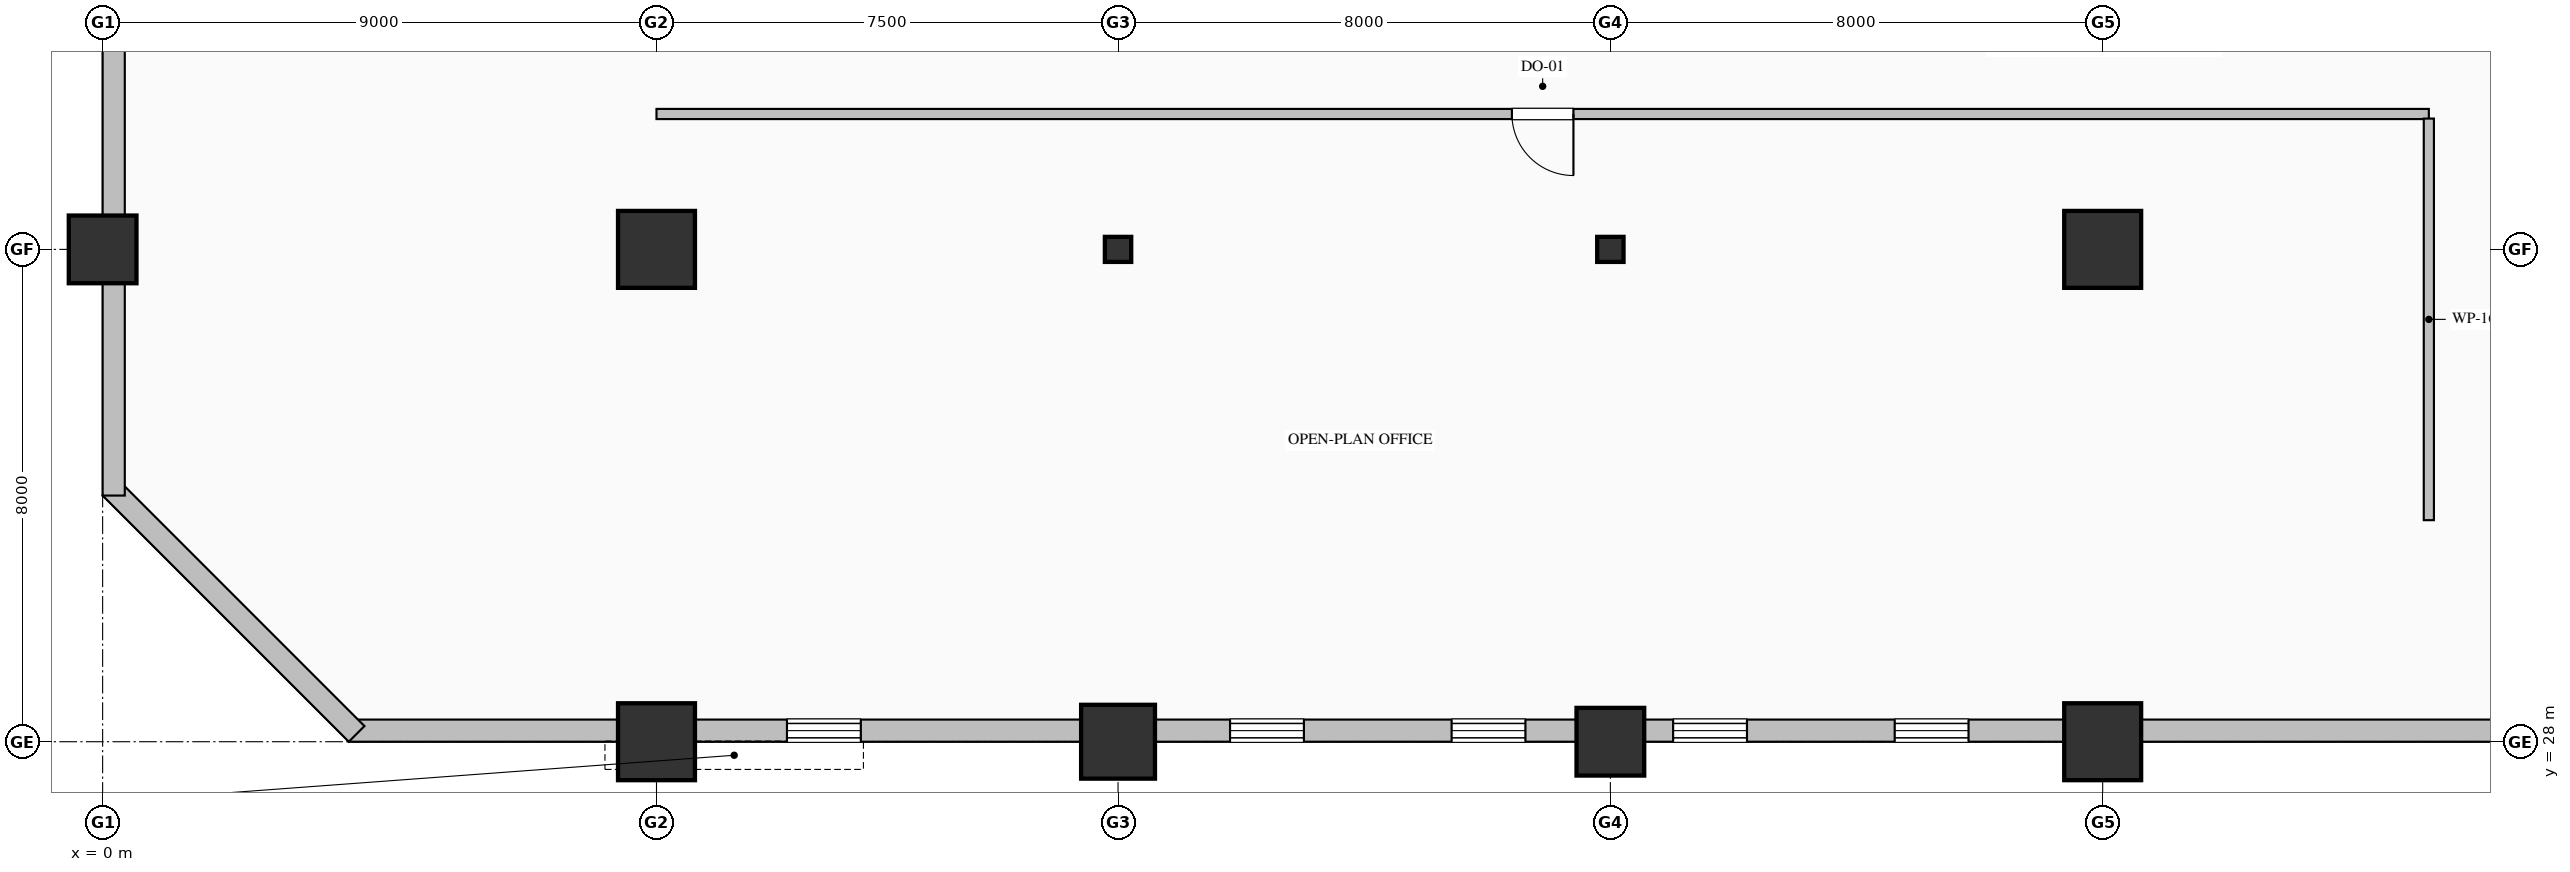
"""IFC4 building model, lengths in metres.
Left out: names, types, materials, properties, quantities, classifications, styles, units other than length and angle.
Written with IfcOpenShell. Run it as: python <this file> out.ifc"""

import sys

from ifc_helpers import new_model, si_unit, direction, frame, frame_2d, origin, origin_2d, place, context, subcontext, project, spatial, rectangle, hollow_rectangle, hollow_circle, i_section, extrude, element, fill, save


model = new_model("IFC4")
c1 = context("Model", 3, precision=1e-05, world=origin(), true_north=direction((0.0, 1.0)))
c2 = subcontext(c1, "Body", "Model", "MODEL_VIEW")
j1 = project(units=[si_unit("LENGTHUNIT", "METRE"), si_unit("PLANEANGLEUNIT", "RADIAN")], contexts=[c1])
p1 = place(None, origin())
s1 = spatial("IfcSite", under=j1, at=p1, CompositionType="ELEMENT")
p2 = place(p1, origin())
s2 = spatial("IfcBuilding", under=s1, at=p2, CompositionType="ELEMENT")
p3 = place(p2, frame((0.0, 0.0, 32.2)))
s3 = spatial("IfcBuildingStorey", under=s2, at=p3, CompositionType="ELEMENT", Elevation=32.2)
p4 = place(p3, frame((0.0, 36.0, 0.0), z_axis=(0.0, 0.0, 1.0), x_axis=(1.0, 0.0, 0.0)))
e1 = element("IfcColumn", 1, at=p4, inside=s3, PredefinedType="COLUMN", context=c2, shape_type="SweptSolid", body=[
    extrude(hollow_rectangle(XDim=1.1, YDim=1.1, WallThickness=0.04, at=origin_2d()), origin(), (0.0, 0.0, 1.0), 4.0),
])
for number, where, z_axis, x_axis in (
    (2, (9.0, 28.0, 0.0), (0.0, 0.0, 1.0), (1.0, 0.0, 0.0)),
    (3, (9.0, 36.0, 0.0), (0.0, 0.0, 1.0), (1.0, 0.0, 0.0)),
):
    element("IfcColumn", number, at=place(p3, frame(where, z_axis=z_axis, x_axis=x_axis)), inside=s3, PredefinedType="COLUMN", context=c2, shape_type="SweptSolid", body=[
        extrude(hollow_rectangle(XDim=1.25, YDim=1.25, WallThickness=0.045, at=origin_2d()), origin(), (0.0, 0.0, 1.0), 4.0),
    ])
p5 = place(p3, frame((16.5, 28.0, 0.0), z_axis=(0.0, 0.0, 1.0), x_axis=(1.0, 0.0, 0.0)))
e4 = element("IfcColumn", 4, at=p5, inside=s3, PredefinedType="COLUMN", context=c2, shape_type="SweptSolid", body=[
    extrude(hollow_circle(Radius=0.6, WallThickness=0.04, at=origin_2d()), origin(), (0.0, 0.0, 1.0), 4.0),
])
p6 = place(p3, frame((16.5, 36.0, 0.0), z_axis=(0.0, 0.0, 1.0), x_axis=(1.0, 0.0, 0.0)))
e5 = element("IfcColumn", 5, at=p6, inside=s3, PredefinedType="COLUMN", context=c2, shape_type="SweptSolid", body=[
    extrude(i_section(OverallWidth=0.407, OverallDepth=0.428, WebThickness=0.02, FlangeThickness=0.035, FilletRadius=0.022, at=origin_2d()), origin(), (0.0, 0.0, 1.0), 4.0),
])
p7 = place(p3, frame((24.5, 28.0, 0.0), z_axis=(0.0, 0.0, 1.0), x_axis=(1.0, 0.0, 0.0)))
e6 = element("IfcColumn", 6, at=p7, inside=s3, PredefinedType="COLUMN", context=c2, shape_type="SweptSolid", body=[
    extrude(hollow_rectangle(XDim=1.1, YDim=1.1, WallThickness=0.04, at=origin_2d()), origin(), (0.0, 0.0, 1.0), 4.0),
])
p8 = place(p3, frame((24.5, 36.0, 0.0), z_axis=(0.0, 0.0, 1.0), x_axis=(1.0, 0.0, 0.0)))
e7 = element("IfcColumn", 7, at=p8, inside=s3, PredefinedType="COLUMN", context=c2, shape_type="SweptSolid", body=[
    extrude(i_section(OverallWidth=0.407, OverallDepth=0.428, WebThickness=0.02, FlangeThickness=0.035, FilletRadius=0.022, at=origin_2d()), origin(), (0.0, 0.0, 1.0), 4.0),
])
for number, where, z_axis, x_axis in (
    (8, (32.5, 28.0, 0.0), (0.0, 0.0, 1.0), (1.0, 0.0, 0.0)),
    (9, (32.5, 36.0, 0.0), (0.0, 0.0, 1.0), (1.0, 0.0, 0.0)),
):
    element("IfcColumn", number, at=place(p3, frame(where, z_axis=z_axis, x_axis=x_axis)), inside=s3, PredefinedType="COLUMN", context=c2, shape_type="SweptSolid", body=[
        extrude(hollow_rectangle(XDim=1.25, YDim=1.25, WallThickness=0.045, at=origin_2d()), origin(), (0.0, 0.0, 1.0), 4.0),
    ])
p9 = place(p3, frame((40.52, 28.18, 0.0), z_axis=(0.0, 0.0, 1.0), x_axis=(-1.0, 0.0, 0.0)))
e10 = element("IfcWall", 10, at=p9, inside=s3, PredefinedType="SOLIDWALL", context=c2, shape_type="SweptSolid", body=[
    extrude(rectangle(XDim=36.52, YDim=0.36, at=frame_2d((18.26, 0.0))), origin(), (0.0, 0.0, 1.0), 3.05),
])
p10 = place(p9, frame((10.2, 0.0, 0.7)))
e11 = element("IfcOpeningElement", 11, at=p10, cuts=e10, PredefinedType="OPENING", context=c2, shape_type="SweptSolid", body=[
    extrude(rectangle(XDim=1.2, YDim=1.85, at=frame_2d((0.6, 0.925))), frame((0.0, 0.19, 0.0), z_axis=(0.0, -1.0, 0.0), x_axis=(1.0, 0.0, 0.0)), (0.0, 0.0, 1.0), 0.38),
])
p11 = place(p9, frame((13.8, 0.0, 0.7)))
e12 = element("IfcOpeningElement", 12, at=p11, cuts=e10, PredefinedType="OPENING", context=c2, shape_type="SweptSolid", body=[
    extrude(rectangle(XDim=1.2, YDim=1.85, at=frame_2d((0.6, 0.925))), frame((0.0, 0.19, 0.0), z_axis=(0.0, -1.0, 0.0), x_axis=(1.0, 0.0, 0.0)), (0.0, 0.0, 1.0), 0.38),
])
p12 = place(p9, frame((17.4, 0.0, 0.7)))
e13 = element("IfcOpeningElement", 13, at=p12, cuts=e10, PredefinedType="OPENING", context=c2, shape_type="SweptSolid", body=[
    extrude(rectangle(XDim=1.2, YDim=1.85, at=frame_2d((0.6, 0.925))), frame((0.0, 0.19, 0.0), z_axis=(0.0, -1.0, 0.0), x_axis=(1.0, 0.0, 0.0)), (0.0, 0.0, 1.0), 0.38),
])
p13 = place(p9, frame((21.0, 0.0, 0.7)))
e14 = element("IfcOpeningElement", 14, at=p13, cuts=e10, PredefinedType="OPENING", context=c2, shape_type="SweptSolid", body=[
    extrude(rectangle(XDim=1.2, YDim=1.85, at=frame_2d((0.6, 0.925))), frame((0.0, 0.19, 0.0), z_axis=(0.0, -1.0, 0.0), x_axis=(1.0, 0.0, 0.0)), (0.0, 0.0, 1.0), 0.38),
])
p14 = place(p9, frame((28.2, 0.0, 0.7)))
e15 = element("IfcOpeningElement", 15, at=p14, cuts=e10, PredefinedType="OPENING", context=c2, shape_type="SweptSolid", body=[
    extrude(rectangle(XDim=1.2, YDim=1.85, at=frame_2d((0.6, 0.925))), frame((0.0, 0.19, 0.0), z_axis=(0.0, -1.0, 0.0), x_axis=(1.0, 0.0, 0.0)), (0.0, 0.0, 1.0), 0.38),
])
p15 = place(p3, frame((4.127, 28.127, 0.0), z_axis=(0.0, 0.0, 1.0), x_axis=(-0.707106781187, 0.707106781187, 0.0)))
e16 = element("IfcWall", 16, at=p15, inside=s3, PredefinedType="SOLIDWALL", context=c2, shape_type="SweptSolid", body=[
    extrude(rectangle(XDim=5.657, YDim=0.36, at=frame_2d((2.828, 0.0))), origin(), (0.0, 0.0, 1.0), 3.75),
])
p16 = place(p3, frame((0.18, 32.0, 0.0), z_axis=(0.0, 0.0, 1.0), x_axis=(0.0, 1.0, 0.0)))
e17 = element("IfcWall", 17, at=p16, inside=s3, PredefinedType="SOLIDWALL", context=c2, shape_type="SweptSolid", body=[
    extrude(rectangle(XDim=16.0, YDim=0.36, at=frame_2d((8.0, 0.0))), origin(), (0.0, 0.0, 1.0), 3.25),
])
p17 = place(p3, frame((37.8, 38.2, 0.0), z_axis=(0.0, 0.0, 1.0), x_axis=(-1.0, 0.0, 0.0)))
e18 = element("IfcWall", 18, at=p17, inside=s3, PredefinedType="PARTITIONING", context=c2, shape_type="SweptSolid", body=[
    extrude(rectangle(XDim=28.8, YDim=0.165, at=frame_2d((14.4, 0.0))), origin(), (0.0, 0.0, 1.0), 3.75),
])
p18 = place(p17, frame((13.9, 0.0, 0.0)))
e19 = element("IfcOpeningElement", 19, at=p18, cuts=e18, PredefinedType="OPENING", context=c2, shape_type="SweptSolid", body=[
    extrude(rectangle(XDim=1.0, YDim=2.15, at=frame_2d((0.5, 1.075))), frame((0.0, 0.093, 0.0), z_axis=(0.0, -1.0, 0.0), x_axis=(1.0, 0.0, 0.0)), (0.0, 0.0, 1.0), 0.185),
])
p19 = place(p3, frame((37.8, 31.6, 0.0), z_axis=(0.0, 0.0, 1.0), x_axis=(0.0, 1.0, 0.0)))
e20 = element("IfcWall", 20, at=p19, inside=s3, PredefinedType="PARTITIONING", context=c2, shape_type="SweptSolid", body=[
    extrude(rectangle(XDim=6.525, YDim=0.165, at=frame_2d((3.263, 0.0))), origin(), (0.0, 0.0, 1.0), 3.75),
])
p20 = place(p10, origin())
e21 = element("IfcWindow", 21, at=p20, inside=s3, PartitioningType="DOUBLE_PANEL_VERTICAL", PredefinedType="WINDOW", context=c2, shape_type="SweptSolid", body=[
    extrude(rectangle(XDim=1.2, YDim=1.85, at=frame_2d((0.6, 0.925))), frame((0.0, 0.15, 0.0), z_axis=(0.0, -1.0, 0.0), x_axis=(1.0, 0.0, 0.0)), (0.0, 0.0, 1.0), 0.06),
])
fill(e11, e21)
p21 = place(p11, origin())
e22 = element("IfcWindow", 22, at=p21, inside=s3, PartitioningType="DOUBLE_PANEL_VERTICAL", PredefinedType="WINDOW", context=c2, shape_type="SweptSolid", body=[
    extrude(rectangle(XDim=1.2, YDim=1.85, at=frame_2d((0.6, 0.925))), frame((0.0, 0.15, 0.0), z_axis=(0.0, -1.0, 0.0), x_axis=(1.0, 0.0, 0.0)), (0.0, 0.0, 1.0), 0.06),
])
fill(e12, e22)
p22 = place(p12, origin())
e23 = element("IfcWindow", 23, at=p22, inside=s3, PartitioningType="DOUBLE_PANEL_VERTICAL", PredefinedType="WINDOW", context=c2, shape_type="SweptSolid", body=[
    extrude(rectangle(XDim=1.2, YDim=1.85, at=frame_2d((0.6, 0.925))), frame((0.0, 0.15, 0.0), z_axis=(0.0, -1.0, 0.0), x_axis=(1.0, 0.0, 0.0)), (0.0, 0.0, 1.0), 0.06),
])
fill(e13, e23)
p23 = place(p13, origin())
e24 = element("IfcWindow", 24, at=p23, inside=s3, PartitioningType="DOUBLE_PANEL_VERTICAL", PredefinedType="WINDOW", context=c2, shape_type="SweptSolid", body=[
    extrude(rectangle(XDim=1.2, YDim=1.85, at=frame_2d((0.6, 0.925))), frame((0.0, 0.15, 0.0), z_axis=(0.0, -1.0, 0.0), x_axis=(1.0, 0.0, 0.0)), (0.0, 0.0, 1.0), 0.06),
])
fill(e14, e24)
p24 = place(p14, origin())
e25 = element("IfcWindow", 25, at=p24, inside=s3, PartitioningType="DOUBLE_PANEL_VERTICAL", PredefinedType="WINDOW", context=c2, shape_type="SweptSolid", body=[
    extrude(rectangle(XDim=1.2, YDim=1.85, at=frame_2d((0.6, 0.925))), frame((0.0, 0.15, 0.0), z_axis=(0.0, -1.0, 0.0), x_axis=(1.0, 0.0, 0.0)), (0.0, 0.0, 1.0), 0.06),
])
fill(e15, e25)
p25 = place(p18, origin())
e26 = element("IfcDoor", 26, at=p25, inside=s3, OperationType="SINGLE_SWING_LEFT", PredefinedType="DOOR", context=c2, shape_type="SweptSolid", body=[
    extrude(rectangle(XDim=1.0, YDim=2.15, at=frame_2d((0.5, 1.075))), frame((0.0, 0.025, 0.0), z_axis=(0.0, -1.0, 0.0), x_axis=(1.0, 0.0, 0.0)), (0.0, 0.0, 1.0), 0.05),
])
fill(e19, e26)
save(model, sys.argv[1])
